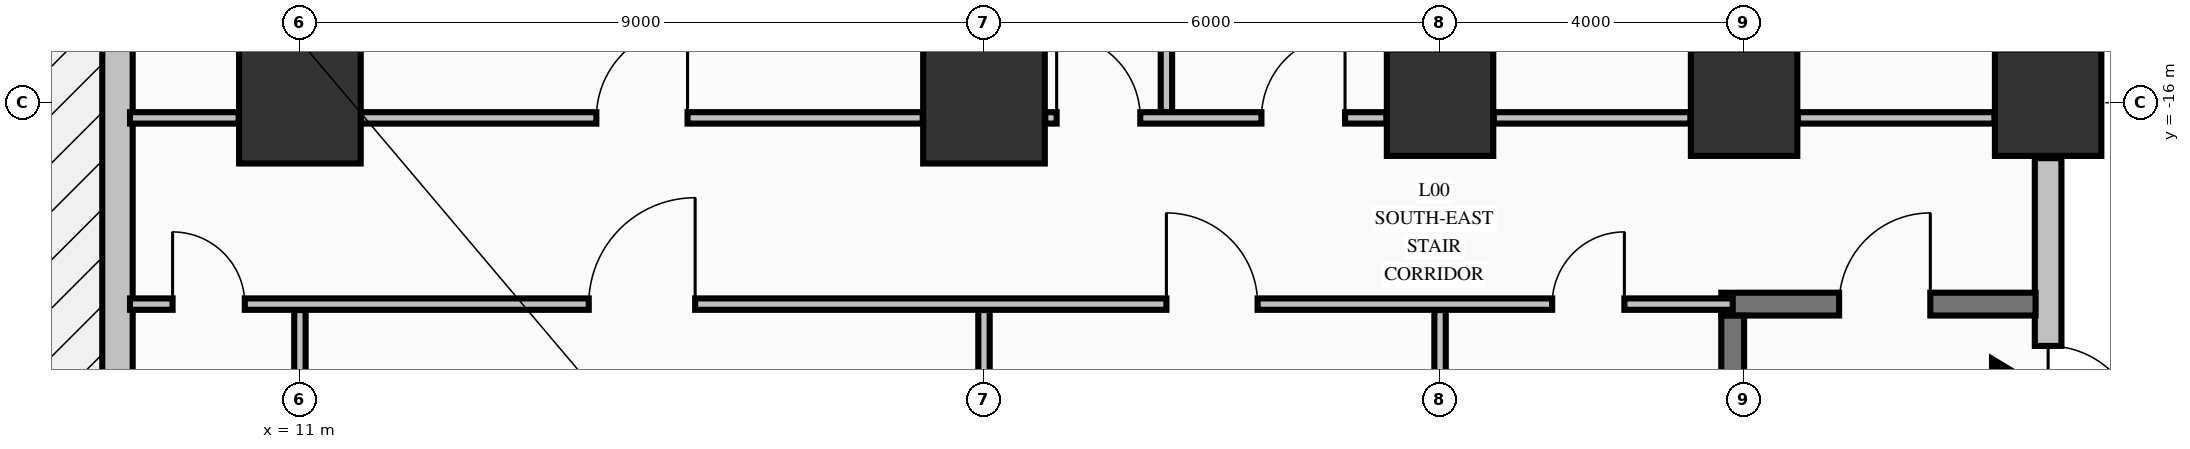
"""IFC4 building model, lengths in metres.
Left out: names, types, materials, properties, quantities, classifications, styles, units other than length and angle.
Written with IfcOpenShell. Run it as: python <this file> out.ifc"""

import sys

from ifc_helpers import new_model, si_unit, direction, frame, frame_2d, origin, origin_2d, place, context, subcontext, project, spatial, rectangle, extrude, element, fill, save


model = new_model("IFC4")
c1 = context("Model", 3, precision=1e-05, world=origin(), true_north=direction((0.0, 1.0)))
c2 = subcontext(c1, "Body", "Model", "MODEL_VIEW")
j1 = project(units=[si_unit("LENGTHUNIT", "METRE"), si_unit("PLANEANGLEUNIT", "RADIAN")], contexts=[c1])
p1 = place(None, origin())
s1 = spatial("IfcSite", under=j1, at=p1, CompositionType="ELEMENT")
p2 = place(p1, origin())
s2 = spatial("IfcBuilding", under=s1, at=p2, CompositionType="ELEMENT")
p3 = place(p2, origin())
s3 = spatial("IfcBuildingStorey", under=s2, at=p3, CompositionType="ELEMENT", Elevation=0.0)
for number, where, z_axis, x_axis in (
    (1, (11.0, -16.0, 0.0), (0.0, 0.0, 1.0), (1.0, 0.0, 0.0)),
    (2, (20.0, -16.0, 0.0), (0.0, 0.0, 1.0), (1.0, 0.0, 0.0)),
):
    element("IfcColumn", number, at=place(p3, frame(where, z_axis=z_axis, x_axis=x_axis)), inside=s3, PredefinedType="COLUMN", context=c2, shape_type="SweptSolid", body=[
        extrude(rectangle(XDim=1.6, YDim=1.6, at=origin_2d()), origin(), (0.0, 0.0, 1.0), 5.09),
    ])
for number, where, z_axis, x_axis in (
    (3, (26.0, -16.0, 0.0), (0.0, 0.0, 1.0), (1.0, 0.0, 0.0)),
    (4, (30.0, -16.0, 0.0), (0.0, 0.0, 1.0), (1.0, 0.0, 0.0)),
    (5, (34.0, -16.0, 0.0), (0.0, 0.0, 1.0), (1.0, 0.0, 0.0)),
):
    element("IfcColumn", number, at=place(p3, frame(where, z_axis=z_axis, x_axis=x_axis)), inside=s3, PredefinedType="COLUMN", context=c2, shape_type="SweptSolid", body=[
        extrude(rectangle(XDim=1.4, YDim=1.4, at=origin_2d()), origin(), (0.0, 0.0, 1.0), 5.09),
    ])
p4 = place(p3, frame((34.0, -16.73, 0.0), z_axis=(0.0, 0.0, 1.0), x_axis=(0.0, -1.0, 0.0)))
e6 = element("IfcWall", 6, at=p4, inside=s3, PredefinedType="STANDARD", context=c2, shape_type="SweptSolid", body=[
    extrude(rectangle(XDim=4.54, YDim=0.35, at=frame_2d((2.27, 0.0))), origin(), (0.0, 0.0, 1.0), 5.09),
])
p5 = place(p4, frame((2.47, 0.0, 0.0)))
e7 = element("IfcOpeningElement", 7, at=p5, cuts=e6, PredefinedType="OPENING", context=c2, shape_type="SweptSolid", body=[
    extrude(rectangle(XDim=1.2, YDim=2.2, at=frame_2d((0.6, 1.1))), frame((0.0, 0.185, 0.0), z_axis=(0.0, -1.0, 0.0), x_axis=(1.0, 0.0, 0.0)), (0.0, 0.0, 1.0), 0.37),
])
p6 = place(p3, frame((8.6, -0.65, 0.0), z_axis=(0.0, 0.0, 1.0), x_axis=(0.0, -1.0, 0.0)))
e8 = element("IfcWall", 8, at=p6, inside=s3, PredefinedType="STANDARD", context=c2, shape_type="SweptSolid", body=[
    extrude(rectangle(XDim=24.7, YDim=0.4, at=frame_2d((12.35, 0.0))), origin(), (0.0, 0.0, 1.0), 4.132),
])
p7 = place(p6, frame((10.5, 0.0, 0.0)))
e9 = element("IfcOpeningElement", 9, at=p7, cuts=e8, PredefinedType="OPENING", context=c2, shape_type="SweptSolid", body=[
    extrude(rectangle(XDim=2.4, YDim=2.6, at=frame_2d((1.2, 1.3))), frame((0.0, 0.21, 0.0), z_axis=(0.0, -1.0, 0.0), x_axis=(1.0, 0.0, 0.0)), (0.0, 0.0, 1.0), 0.42),
])
p8 = place(p3, frame((29.7, -18.65, 0.0), z_axis=(0.0, 0.0, 1.0), x_axis=(1.0, 0.0, 0.0)))
e10 = element("IfcWall", 10, at=p8, inside=s3, PredefinedType="SHEAR", context=c2, shape_type="SweptSolid", body=[
    extrude(rectangle(XDim=4.135, YDim=0.3, at=frame_2d((2.067, 0.0))), origin(), (0.0, 0.0, 1.0), 5.09),
])
p9 = place(p8, frame((1.55, 0.0, 0.0)))
e11 = element("IfcOpeningElement", 11, at=p9, cuts=e10, PredefinedType="OPENING", context=c2, shape_type="SweptSolid", body=[
    extrude(rectangle(XDim=1.2, YDim=2.15, at=frame_2d((0.6, 1.075))), frame((0.0, 0.16, 0.0), z_axis=(0.0, -1.0, 0.0), x_axis=(1.0, 0.0, 0.0)), (0.0, 0.0, 1.0), 0.32),
])
p10 = place(p3, frame((8.765, -18.65, 0.0), z_axis=(0.0, 0.0, 1.0), x_axis=(1.0, 0.0, 0.0)))
e12 = element("IfcWall", 12, at=p10, inside=s3, PredefinedType="PARTITIONING", context=c2, shape_type="SweptSolid", body=[
    extrude(rectangle(XDim=21.085, YDim=0.15, at=frame_2d((10.542, 0.0))), origin(), (0.0, 0.0, 1.0), 5.09),
])
p11 = place(p10, frame((0.56, 0.0, 0.0)))
e13 = element("IfcOpeningElement", 13, at=p11, cuts=e12, PredefinedType="OPENING", context=c2, shape_type="SweptSolid", body=[
    extrude(rectangle(XDim=0.95, YDim=2.15, at=frame_2d((0.475, 1.075))), frame((0.0, 0.085, 0.0), z_axis=(0.0, -1.0, 0.0), x_axis=(1.0, 0.0, 0.0)), (0.0, 0.0, 1.0), 0.17),
])
p12 = place(p10, frame((6.035, 0.0, 0.0)))
e14 = element("IfcOpeningElement", 14, at=p12, cuts=e12, PredefinedType="OPENING", context=c2, shape_type="SweptSolid", body=[
    extrude(rectangle(XDim=1.4, YDim=2.2, at=frame_2d((0.7, 1.1))), frame((0.0, 0.085, 0.0), z_axis=(0.0, -1.0, 0.0), x_axis=(1.0, 0.0, 0.0)), (0.0, 0.0, 1.0), 0.17),
])
p13 = place(p10, frame((13.635, 0.0, 0.0)))
e15 = element("IfcOpeningElement", 15, at=p13, cuts=e12, PredefinedType="OPENING", context=c2, shape_type="SweptSolid", body=[
    extrude(rectangle(XDim=1.2, YDim=2.15, at=frame_2d((0.6, 1.075))), frame((0.0, 0.085, 0.0), z_axis=(0.0, -1.0, 0.0), x_axis=(1.0, 0.0, 0.0)), (0.0, 0.0, 1.0), 0.17),
])
p14 = place(p10, frame((18.71, 0.0, 0.0)))
e16 = element("IfcOpeningElement", 16, at=p14, cuts=e12, PredefinedType="OPENING", context=c2, shape_type="SweptSolid", body=[
    extrude(rectangle(XDim=0.95, YDim=2.15, at=frame_2d((0.475, 1.075))), frame((0.0, 0.085, 0.0), z_axis=(0.0, -1.0, 0.0), x_axis=(1.0, 0.0, 0.0)), (0.0, 0.0, 1.0), 0.17),
])
p15 = place(p3, frame((8.765, -16.2, 0.0), z_axis=(0.0, 0.0, 1.0), x_axis=(1.0, 0.0, 0.0)))
e17 = element("IfcWall", 17, at=p15, inside=s3, PredefinedType="PARTITIONING", context=c2, shape_type="SweptSolid", body=[
    extrude(rectangle(XDim=1.429, YDim=0.15, at=frame_2d((0.715, 0.0))), origin(), (0.0, 0.0, 1.0), 5.09),
])
p16 = place(p3, frame((11.806, -16.2, 0.0), z_axis=(0.0, 0.0, 1.0), x_axis=(1.0, 0.0, 0.0)))
e18 = element("IfcWall", 18, at=p16, inside=s3, PredefinedType="PARTITIONING", context=c2, shape_type="SweptSolid", body=[
    extrude(rectangle(XDim=7.388, YDim=0.15, at=frame_2d((3.694, 0.0))), origin(), (0.0, 0.0, 1.0), 4.132),
])
p17 = place(p16, frame((3.094, 0.0, 0.0)))
e19 = element("IfcOpeningElement", 19, at=p17, cuts=e18, PredefinedType="OPENING", context=c2, shape_type="SweptSolid", body=[
    extrude(rectangle(XDim=1.2, YDim=2.15, at=frame_2d((0.6, 1.075))), frame((0.0, 0.085, 0.0), z_axis=(0.0, -1.0, 0.0), x_axis=(1.0, 0.0, 0.0)), (0.0, 0.0, 1.0), 0.17),
])
p18 = place(p3, frame((20.806, -16.2, 0.0), z_axis=(0.0, 0.0, 1.0), x_axis=(1.0, 0.0, 0.0)))
e20 = element("IfcWall", 20, at=p18, inside=s3, PredefinedType="PARTITIONING", context=c2, shape_type="SweptSolid", body=[
    extrude(rectangle(XDim=4.488, YDim=0.15, at=frame_2d((2.244, 0.0))), origin(), (0.0, 0.0, 1.0), 4.132),
])
p19 = place(p18, frame((0.15, 0.0, 0.0)))
e21 = element("IfcOpeningElement", 21, at=p19, cuts=e20, PredefinedType="OPENING", context=c2, shape_type="SweptSolid", body=[
    extrude(rectangle(XDim=1.1, YDim=2.15, at=frame_2d((0.55, 1.075))), frame((0.0, 0.085, 0.0), z_axis=(0.0, -1.0, 0.0), x_axis=(1.0, 0.0, 0.0)), (0.0, 0.0, 1.0), 0.17),
])
p20 = place(p18, frame((2.844, 0.0, 0.0)))
e22 = element("IfcOpeningElement", 22, at=p20, cuts=e20, PredefinedType="OPENING", context=c2, shape_type="SweptSolid", body=[
    extrude(rectangle(XDim=1.1, YDim=2.15, at=frame_2d((0.55, 1.075))), frame((0.0, 0.085, 0.0), z_axis=(0.0, -1.0, 0.0), x_axis=(1.0, 0.0, 0.0)), (0.0, 0.0, 1.0), 0.17),
])
for number, where, z_axis, x_axis in (
    (23, (26.706, -16.2, 0.0), (0.0, 0.0, 1.0), (1.0, 0.0, 0.0)),
    (24, (30.706, -16.2, 0.0), (0.0, 0.0, 1.0), (1.0, 0.0, 0.0)),
):
    element("IfcWall", number, at=place(p3, frame(where, z_axis=z_axis, x_axis=x_axis)), inside=s3, PredefinedType="PARTITIONING", context=c2, shape_type="SweptSolid", body=[
        extrude(rectangle(XDim=2.588, YDim=0.15, at=frame_2d((1.294, 0.0))), origin(), (0.0, 0.0, 1.0), 4.132),
    ])
p21 = place(p3, frame((29.85, -28.296, 0.0), z_axis=(0.0, 0.0, 1.0), x_axis=(0.0, 1.0, 0.0)))
e25 = element("IfcWall", 25, at=p21, inside=s3, PredefinedType="SHEAR", context=c2, shape_type="SweptSolid", body=[
    extrude(rectangle(XDim=9.494, YDim=0.3, at=frame_2d((4.747, 0.0))), origin(), (0.0, 0.0, 1.0), 5.09),
])
for number, where, z_axis, x_axis in (
    (26, (11.0, -21.194, 0.0), (0.0, 0.0, 1.0), (0.0, 1.0, 0.0)),
    (27, (20.0, -21.194, 0.0), (0.0, 0.0, 1.0), (0.0, 1.0, 0.0)),
):
    element("IfcWall", number, at=place(p3, frame(where, z_axis=z_axis, x_axis=x_axis)), inside=s3, PredefinedType="PARTITIONING", context=c2, shape_type="SweptSolid", body=[
        extrude(rectangle(XDim=2.466, YDim=0.15, at=frame_2d((1.233, 0.0))), origin(), (0.0, 0.0, 1.0), 4.132),
    ])
p22 = place(p3, frame((22.4, -16.122, 0.0), z_axis=(0.0, 0.0, 1.0), x_axis=(0.0, 1.0, 0.0)))
e28 = element("IfcWall", 28, at=p22, inside=s3, PredefinedType="PARTITIONING", context=c2, shape_type="SweptSolid", body=[
    extrude(rectangle(XDim=17.194, YDim=0.15, at=frame_2d((8.597, 0.0))), origin(), (0.0, 0.0, 1.0), 5.09),
])
p23 = place(p22, frame((10.522, 0.0, 0.0)))
e29 = element("IfcOpeningElement", 29, at=p23, cuts=e28, PredefinedType="OPENING", context=c2, shape_type="SweptSolid", body=[
    extrude(rectangle(XDim=1.2, YDim=2.15, at=frame_2d((0.6, 1.075))), frame((0.0, 0.085, 0.0), z_axis=(0.0, -1.0, 0.0), x_axis=(1.0, 0.0, 0.0)), (0.0, 0.0, 1.0), 0.17),
])
p24 = place(p3, frame((26.0, -21.294, 0.0), z_axis=(0.0, 0.0, 1.0), x_axis=(0.0, 1.0, 0.0)))
e30 = element("IfcWall", 30, at=p24, inside=s3, PredefinedType="PARTITIONING", context=c2, shape_type="SweptSolid", body=[
    extrude(rectangle(XDim=2.566, YDim=0.15, at=frame_2d((1.283, 0.0))), origin(), (0.0, 0.0, 1.0), 4.132),
])
p25 = place(p5, origin())
e31 = element("IfcDoor", 31, at=p25, inside=s3, OperationType="SINGLE_SWING_RIGHT", PredefinedType="DOOR", context=c2, shape_type="SweptSolid", body=[
    extrude(rectangle(XDim=1.2, YDim=2.2, at=frame_2d((0.6, 1.1))), frame((0.0, 0.025, 0.0), z_axis=(0.0, -1.0, 0.0), x_axis=(1.0, 0.0, 0.0)), (0.0, 0.0, 1.0), 0.05),
])
fill(e7, e31)
p26 = place(p9, origin())
e32 = element("IfcDoor", 32, at=p26, inside=s3, OperationType="SINGLE_SWING_RIGHT", PredefinedType="DOOR", context=c2, shape_type="SweptSolid", body=[
    extrude(rectangle(XDim=1.2, YDim=2.15, at=frame_2d((0.6, 1.075))), frame((0.0, 0.025, 0.0), z_axis=(0.0, -1.0, 0.0), x_axis=(1.0, 0.0, 0.0)), (0.0, 0.0, 1.0), 0.05),
])
fill(e11, e32)
p27 = place(p17, origin())
e33 = element("IfcDoor", 33, at=p27, inside=s3, OperationType="SINGLE_SWING_RIGHT", PredefinedType="DOOR", context=c2, shape_type="SweptSolid", body=[
    extrude(rectangle(XDim=1.2, YDim=2.15, at=frame_2d((0.6, 1.075))), frame((0.0, 0.025, 0.0), z_axis=(0.0, -1.0, 0.0), x_axis=(1.0, 0.0, 0.0)), (0.0, 0.0, 1.0), 0.05),
])
fill(e19, e33)
p28 = place(p19, origin())
e34 = element("IfcDoor", 34, at=p28, inside=s3, OperationType="SINGLE_SWING_LEFT", PredefinedType="DOOR", context=c2, shape_type="SweptSolid", body=[
    extrude(rectangle(XDim=1.1, YDim=2.15, at=frame_2d((0.55, 1.075))), frame((0.0, 0.025, 0.0), z_axis=(0.0, -1.0, 0.0), x_axis=(1.0, 0.0, 0.0)), (0.0, 0.0, 1.0), 0.05),
])
fill(e21, e34)
p29 = place(p11, origin())
e35 = element("IfcDoor", 35, at=p29, inside=s3, OperationType="SINGLE_SWING_LEFT", PredefinedType="DOOR", context=c2, shape_type="SweptSolid", body=[
    extrude(rectangle(XDim=0.95, YDim=2.15, at=frame_2d((0.475, 1.075))), frame((0.0, 0.025, 0.0), z_axis=(0.0, -1.0, 0.0), x_axis=(1.0, 0.0, 0.0)), (0.0, 0.0, 1.0), 0.05),
])
fill(e13, e35)
p30 = place(p12, origin())
e36 = element("IfcDoor", 36, at=p30, inside=s3, OperationType="SINGLE_SWING_RIGHT", PredefinedType="DOOR", context=c2, shape_type="SweptSolid", body=[
    extrude(rectangle(XDim=1.4, YDim=2.2, at=frame_2d((0.7, 1.1))), frame((0.0, 0.025, 0.0), z_axis=(0.0, -1.0, 0.0), x_axis=(1.0, 0.0, 0.0)), (0.0, 0.0, 1.0), 0.05),
])
fill(e14, e36)
p31 = place(p13, origin())
e37 = element("IfcDoor", 37, at=p31, inside=s3, OperationType="SINGLE_SWING_LEFT", PredefinedType="DOOR", context=c2, shape_type="SweptSolid", body=[
    extrude(rectangle(XDim=1.2, YDim=2.15, at=frame_2d((0.6, 1.075))), frame((0.0, 0.025, 0.0), z_axis=(0.0, -1.0, 0.0), x_axis=(1.0, 0.0, 0.0)), (0.0, 0.0, 1.0), 0.05),
])
fill(e15, e37)
p32 = place(p14, origin())
e38 = element("IfcDoor", 38, at=p32, inside=s3, OperationType="SINGLE_SWING_RIGHT", PredefinedType="DOOR", context=c2, shape_type="SweptSolid", body=[
    extrude(rectangle(XDim=0.95, YDim=2.15, at=frame_2d((0.475, 1.075))), frame((0.0, 0.025, 0.0), z_axis=(0.0, -1.0, 0.0), x_axis=(1.0, 0.0, 0.0)), (0.0, 0.0, 1.0), 0.05),
])
fill(e16, e38)
p33 = place(p20, origin())
e39 = element("IfcDoor", 39, at=p33, inside=s3, OperationType="SINGLE_SWING_RIGHT", PredefinedType="DOOR", context=c2, shape_type="SweptSolid", body=[
    extrude(rectangle(XDim=1.1, YDim=2.15, at=frame_2d((0.55, 1.075))), frame((0.0, 0.025, 0.0), z_axis=(0.0, -1.0, 0.0), x_axis=(1.0, 0.0, 0.0)), (0.0, 0.0, 1.0), 0.05),
])
fill(e22, e39)
save(model, sys.argv[1])
